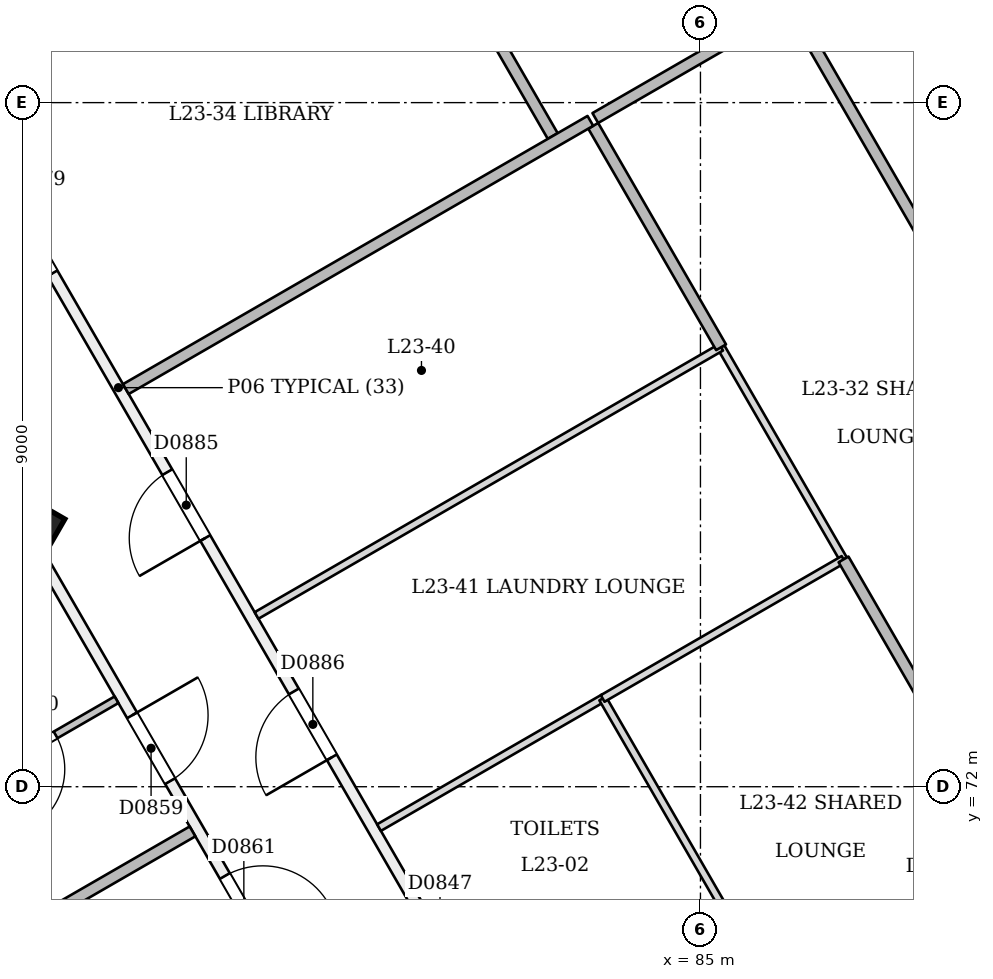
"""IFC4 building model, lengths in metres.
Left out: names, types, materials, properties, quantities, classifications, styles, units other than length and angle.
Written with IfcOpenShell. Run it as: python <this file> out.ifc"""

import sys

from ifc_helpers import new_model, si_unit, direction, frame, frame_2d, origin, origin_2d, place, context, subcontext, project, spatial, rectangle, extrude, element, fill, save


model = new_model("IFC4")
c1 = context("Model", 3, precision=1e-05, world=origin(), true_north=direction((0.0, 1.0)))
c2 = subcontext(c1, "Body", "Model", "MODEL_VIEW")
j1 = project(units=[si_unit("LENGTHUNIT", "METRE"), si_unit("PLANEANGLEUNIT", "RADIAN")], contexts=[c1])
p1 = place(None, origin())
s1 = spatial("IfcSite", under=j1, at=p1, CompositionType="ELEMENT")
p2 = place(p1, origin())
s2 = spatial("IfcBuilding", under=s1, at=p2, CompositionType="ELEMENT")
p3 = place(p2, frame((0.0, 0.0, 91.8)))
s3 = spatial("IfcBuildingStorey", under=s2, at=p3, CompositionType="ELEMENT", Elevation=91.8)
p4 = place(p3, frame((76.132, 75.346, -0.021), z_axis=(0.02215519141, 0.038415882353, 0.999016199807), x_axis=(-0.865363485721, -0.499670956286, 0.038405377555)))
e1 = element("IfcColumn", 1, at=p4, inside=s3, PredefinedType="COLUMN", context=c2, shape_type="SweptSolid", body=[
    extrude(rectangle(XDim=0.7, YDim=0.7, at=origin_2d()), origin(), (0.0, 0.0, 1.0), 3.604),
])
p5 = place(p3, frame((84.935, 64.1, 0.0), z_axis=(0.0, 0.0, 1.0), x_axis=(-0.500003132916, 0.866023594987, 0.0)))
e2 = element("IfcWall", 2, at=p5, inside=s3, PredefinedType="PARTITIONING", context=c2, shape_type="SweptSolid", body=[
    extrude(rectangle(XDim=30.368, YDim=0.15, at=frame_2d((15.184, 0.0))), origin(), (0.0, 0.0, 1.0), 3.3),
])
p6 = place(p5, frame((6.273, 0.0, 0.0)))
e3 = element("IfcOpeningElement", 3, at=p6, cuts=e2, PredefinedType="OPENING", context=c2, shape_type="SweptSolid", body=[
    extrude(rectangle(XDim=0.9, YDim=2.1, at=frame_2d((0.45, 1.05))), frame((0.0, 0.085, 0.0), z_axis=(0.0, -1.0, 0.0), x_axis=(1.0, 0.0, 0.0)), (0.0, 0.0, 1.0), 0.171),
])
p7 = place(p5, frame((21.525, 0.0, 0.0)))
e4 = element("IfcOpeningElement", 4, at=p7, cuts=e2, PredefinedType="OPENING", context=c2, shape_type="SweptSolid", body=[
    extrude(rectangle(XDim=1.0, YDim=2.1, at=frame_2d((0.5, 1.05))), frame((0.0, 0.085, 0.0), z_axis=(0.0, -1.0, 0.0), x_axis=(1.0, 0.0, 0.0)), (0.0, 0.0, 1.0), 0.171),
])
p8 = place(p5, frame((16.921, 0.0, 0.0)))
e5 = element("IfcOpeningElement", 5, at=p8, cuts=e2, PredefinedType="OPENING", context=c2, shape_type="SweptSolid", body=[
    extrude(rectangle(XDim=1.0, YDim=2.1, at=frame_2d((0.5, 1.05))), frame((0.0, 0.085, 0.0), z_axis=(0.0, -1.0, 0.0), x_axis=(1.0, 0.0, 0.0)), (0.0, 0.0, 1.0), 0.171),
])
p9 = place(p5, frame((26.041, 0.0, 0.0)))
e6 = element("IfcOpeningElement", 6, at=p9, cuts=e2, PredefinedType="OPENING", context=c2, shape_type="SweptSolid", body=[
    extrude(rectangle(XDim=1.0, YDim=2.1, at=frame_2d((0.5, 1.05))), frame((0.0, 0.085, 0.0), z_axis=(0.0, -1.0, 0.0), x_axis=(1.0, 0.0, 0.0)), (0.0, 0.0, 1.0), 0.171),
])
p10 = place(p5, frame((12.9, 0.0, 0.0)))
e7 = element("IfcOpeningElement", 7, at=p10, cuts=e2, PredefinedType="OPENING", context=c2, shape_type="SweptSolid", body=[
    extrude(rectangle(XDim=1.0, YDim=2.1, at=frame_2d((0.5, 1.05))), frame((0.0, 0.085, 0.0), z_axis=(0.0, -1.0, 0.0), x_axis=(1.0, 0.0, 0.0)), (0.0, 0.0, 1.0), 0.171),
])
p11 = place(p5, frame((9.569, 0.0, 0.0)))
e8 = element("IfcOpeningElement", 8, at=p11, cuts=e2, PredefinedType="OPENING", context=c2, shape_type="SweptSolid", body=[
    extrude(rectangle(XDim=1.0, YDim=2.1, at=frame_2d((0.5, 1.05))), frame((0.0, 0.085, 0.0), z_axis=(0.0, -1.0, 0.0), x_axis=(1.0, 0.0, 0.0)), (0.0, 0.0, 1.0), 0.171),
])
p12 = place(p3, frame((100.249, 90.4, 0.0), z_axis=(0.0, 0.0, 1.0), x_axis=(-0.500002168127, -0.866024152012, 0.0)))
e9 = element("IfcWall", 9, at=p12, inside=s3, PredefinedType="PARTITIONING", context=c2, shape_type="SweptSolid", body=[
    extrude(rectangle(XDim=30.498, YDim=0.15, at=frame_2d((15.249, 0.0))), origin(), (0.0, 0.0, 1.0), 3.3),
])
p13 = place(p12, frame((27.157, 0.0, 0.0)))
e10 = element("IfcOpeningElement", 10, at=p13, cuts=e9, PredefinedType="OPENING", context=c2, shape_type="SweptSolid", body=[
    extrude(rectangle(XDim=0.9, YDim=2.1, at=frame_2d((0.45, 1.05))), frame((0.0, 0.085, 0.0), z_axis=(0.0, -1.0, 0.0), x_axis=(1.0, 0.0, 0.0)), (0.0, 0.0, 1.0), 0.171),
])
p14 = place(p12, frame((2.412, 0.0, 0.0)))
e11 = element("IfcOpeningElement", 11, at=p14, cuts=e9, PredefinedType="OPENING", context=c2, shape_type="SweptSolid", body=[
    extrude(rectangle(XDim=1.0, YDim=2.1, at=frame_2d((0.5, 1.05))), frame((0.0, 0.085, 0.0), z_axis=(0.0, -1.0, 0.0), x_axis=(1.0, 0.0, 0.0)), (0.0, 0.0, 1.0), 0.171),
])
p15 = place(p12, frame((11.533, 0.0, 0.0)))
e12 = element("IfcOpeningElement", 12, at=p15, cuts=e9, PredefinedType="OPENING", context=c2, shape_type="SweptSolid", body=[
    extrude(rectangle(XDim=1.0, YDim=2.1, at=frame_2d((0.5, 1.05))), frame((0.0, 0.085, 0.0), z_axis=(0.0, -1.0, 0.0), x_axis=(1.0, 0.0, 0.0)), (0.0, 0.0, 1.0), 0.171),
])
p16 = place(p12, frame((18.89, 0.0, 0.0)))
e13 = element("IfcOpeningElement", 13, at=p16, cuts=e9, PredefinedType="OPENING", context=c2, shape_type="SweptSolid", body=[
    extrude(rectangle(XDim=1.2, YDim=2.1, at=frame_2d((0.6, 1.05))), frame((0.0, 0.085, 0.0), z_axis=(0.0, -1.0, 0.0), x_axis=(1.0, 0.0, 0.0)), (0.0, 0.0, 1.0), 0.171),
])
p17 = place(p12, frame((7.003, 0.0, 0.0)))
e14 = element("IfcOpeningElement", 14, at=p17, cuts=e9, PredefinedType="OPENING", context=c2, shape_type="SweptSolid", body=[
    extrude(rectangle(XDim=1.0, YDim=2.1, at=frame_2d((0.5, 1.05))), frame((0.0, 0.085, 0.0), z_axis=(0.0, -1.0, 0.0), x_axis=(1.0, 0.0, 0.0)), (0.0, 0.0, 1.0), 0.171),
])
p18 = place(p12, frame((15.43, 0.0, 0.0)))
e15 = element("IfcOpeningElement", 15, at=p18, cuts=e9, PredefinedType="OPENING", context=c2, shape_type="SweptSolid", body=[
    extrude(rectangle(XDim=1.0, YDim=2.1, at=frame_2d((0.5, 1.05))), frame((0.0, 0.085, 0.0), z_axis=(0.0, -1.0, 0.0), x_axis=(1.0, 0.0, 0.0)), (0.0, 0.0, 1.0), 0.171),
])
p19 = place(p12, frame((22.512, 0.0, 0.0)))
e16 = element("IfcOpeningElement", 16, at=p19, cuts=e9, PredefinedType="OPENING", context=c2, shape_type="SweptSolid", body=[
    extrude(rectangle(XDim=1.2, YDim=2.1, at=frame_2d((0.6, 1.05))), frame((0.0, 0.085, 0.0), z_axis=(0.0, -1.0, 0.0), x_axis=(1.0, 0.0, 0.0)), (0.0, 0.0, 1.0), 0.171),
])
p20 = place(p3, frame((63.319, 97.54, 0.0), z_axis=(0.0, 0.0, 1.0), x_axis=(0.500001382442, -0.86602460563, 0.0)))
e17 = element("IfcWall", 17, at=p20, inside=s3, PredefinedType="PARTITIONING", context=c2, shape_type="SweptSolid", body=[
    extrude(rectangle(XDim=42.252, YDim=0.15, at=frame_2d((21.126, 0.0))), origin(), (0.0, 0.0, 1.0), 2.9),
])
p21 = place(p20, frame((3.076, 0.0, 0.0)))
e18 = element("IfcOpeningElement", 18, at=p21, cuts=e17, PredefinedType="OPENING", context=c2, shape_type="SweptSolid", body=[
    extrude(rectangle(XDim=1.2, YDim=2.1, at=frame_2d((0.6, 1.05))), frame((0.0, 0.085, 0.0), z_axis=(0.0, -1.0, 0.0), x_axis=(1.0, 0.0, 0.0)), (0.0, 0.0, 1.0), 0.171),
])
p22 = place(p20, frame((10.455, 0.0, 0.0)))
e19 = element("IfcOpeningElement", 19, at=p22, cuts=e17, PredefinedType="OPENING", context=c2, shape_type="SweptSolid", body=[
    extrude(rectangle(XDim=1.1, YDim=2.1, at=frame_2d((0.55, 1.05))), frame((0.0, 0.085, 0.0), z_axis=(0.0, -1.0, 0.0), x_axis=(1.0, 0.0, 0.0)), (0.0, 0.0, 1.0), 0.171),
])
p23 = place(p20, frame((13.876, 0.0, 0.0)))
e20 = element("IfcOpeningElement", 20, at=p23, cuts=e17, PredefinedType="OPENING", context=c2, shape_type="SweptSolid", body=[
    extrude(rectangle(XDim=1.0, YDim=2.1, at=frame_2d((0.5, 1.05))), frame((0.0, 0.085, 0.0), z_axis=(0.0, -1.0, 0.0), x_axis=(1.0, 0.0, 0.0)), (0.0, 0.0, 1.0), 0.171),
])
p24 = place(p20, frame((18.376, 0.0, 0.0)))
e21 = element("IfcOpeningElement", 21, at=p24, cuts=e17, PredefinedType="OPENING", context=c2, shape_type="SweptSolid", body=[
    extrude(rectangle(XDim=1.0, YDim=2.1, at=frame_2d((0.5, 1.05))), frame((0.0, 0.085, 0.0), z_axis=(0.0, -1.0, 0.0), x_axis=(1.0, 0.0, 0.0)), (0.0, 0.0, 1.0), 0.171),
])
p25 = place(p20, frame((21.731, 0.0, 0.0)))
e22 = element("IfcOpeningElement", 22, at=p25, cuts=e17, PredefinedType="OPENING", context=c2, shape_type="SweptSolid", body=[
    extrude(rectangle(XDim=1.0, YDim=2.1, at=frame_2d((0.5, 1.05))), frame((0.0, 0.085, 0.0), z_axis=(0.0, -1.0, 0.0), x_axis=(1.0, 0.0, 0.0)), (0.0, 0.0, 1.0), 0.171),
])
p26 = place(p20, frame((28.406, 0.0, 0.0)))
e23 = element("IfcOpeningElement", 23, at=p26, cuts=e17, PredefinedType="OPENING", context=c2, shape_type="SweptSolid", body=[
    extrude(rectangle(XDim=1.0, YDim=2.1, at=frame_2d((0.5, 1.05))), frame((0.0, 0.085, 0.0), z_axis=(0.0, -1.0, 0.0), x_axis=(1.0, 0.0, 0.0)), (0.0, 0.0, 1.0), 0.171),
])
p27 = place(p20, frame((30.847, 0.0, 0.0)))
e24 = element("IfcOpeningElement", 24, at=p27, cuts=e17, PredefinedType="OPENING", context=c2, shape_type="SweptSolid", body=[
    extrude(rectangle(XDim=1.0, YDim=2.1, at=frame_2d((0.5, 1.05))), frame((0.0, 0.085, 0.0), z_axis=(0.0, -1.0, 0.0), x_axis=(1.0, 0.0, 0.0)), (0.0, 0.0, 1.0), 0.171),
])
p28 = place(p20, frame((37.989, 0.0, 0.0)))
e25 = element("IfcOpeningElement", 25, at=p28, cuts=e17, PredefinedType="OPENING", context=c2, shape_type="SweptSolid", body=[
    extrude(rectangle(XDim=1.2, YDim=2.1, at=frame_2d((0.6, 1.05))), frame((0.0, 0.085, 0.0), z_axis=(0.0, -1.0, 0.0), x_axis=(1.0, 0.0, 0.0)), (0.0, 0.0, 1.0), 0.171),
])
p29 = place(p3, frame((85.554, 60.948, 0.0), z_axis=(0.0, 0.0, 1.0), x_axis=(0.500001382442, 0.86602460563, 0.0)))
e26 = element("IfcWall", 26, at=p29, inside=s3, PredefinedType="PARTITIONING", context=c2, shape_type="SweptSolid", body=[
    extrude(rectangle(XDim=42.252, YDim=0.15, at=frame_2d((21.126, 0.0))), origin(), (0.0, 0.0, 1.0), 2.9),
])
p30 = place(p29, frame((0.285, 0.0, 0.0)))
e27 = element("IfcOpeningElement", 27, at=p30, cuts=e26, PredefinedType="OPENING", context=c2, shape_type="SweptSolid", body=[
    extrude(rectangle(XDim=1.2, YDim=2.1, at=frame_2d((0.6, 1.05))), frame((0.0, 0.085, 0.0), z_axis=(0.0, -1.0, 0.0), x_axis=(1.0, 0.0, 0.0)), (0.0, 0.0, 1.0), 0.171),
])
p31 = place(p29, frame((3.731, 0.0, 0.0)))
e28 = element("IfcOpeningElement", 28, at=p31, cuts=e26, PredefinedType="OPENING", context=c2, shape_type="SweptSolid", body=[
    extrude(rectangle(XDim=1.0, YDim=2.1, at=frame_2d((0.5, 1.05))), frame((0.0, 0.085, 0.0), z_axis=(0.0, -1.0, 0.0), x_axis=(1.0, 0.0, 0.0)), (0.0, 0.0, 1.0), 0.171),
])
p32 = place(p29, frame((11.526, 0.0, 0.0)))
e29 = element("IfcOpeningElement", 29, at=p32, cuts=e26, PredefinedType="OPENING", context=c2, shape_type="SweptSolid", body=[
    extrude(rectangle(XDim=1.2, YDim=2.1, at=frame_2d((0.6, 1.05))), frame((0.0, 0.085, 0.0), z_axis=(0.0, -1.0, 0.0), x_axis=(1.0, 0.0, 0.0)), (0.0, 0.0, 1.0), 0.171),
])
p33 = place(p29, frame((18.376, 0.0, 0.0)))
e30 = element("IfcOpeningElement", 30, at=p33, cuts=e26, PredefinedType="OPENING", context=c2, shape_type="SweptSolid", body=[
    extrude(rectangle(XDim=1.0, YDim=2.1, at=frame_2d((0.5, 1.05))), frame((0.0, 0.085, 0.0), z_axis=(0.0, -1.0, 0.0), x_axis=(1.0, 0.0, 0.0)), (0.0, 0.0, 1.0), 0.171),
])
p34 = place(p29, frame((21.731, 0.0, 0.0)))
e31 = element("IfcOpeningElement", 31, at=p34, cuts=e26, PredefinedType="OPENING", context=c2, shape_type="SweptSolid", body=[
    extrude(rectangle(XDim=1.0, YDim=2.1, at=frame_2d((0.5, 1.05))), frame((0.0, 0.085, 0.0), z_axis=(0.0, -1.0, 0.0), x_axis=(1.0, 0.0, 0.0)), (0.0, 0.0, 1.0), 0.171),
])
p35 = place(p29, frame((27.376, 0.0, 0.0)))
e32 = element("IfcOpeningElement", 32, at=p35, cuts=e26, PredefinedType="OPENING", context=c2, shape_type="SweptSolid", body=[
    extrude(rectangle(XDim=1.0, YDim=2.1, at=frame_2d((0.5, 1.05))), frame((0.0, 0.085, 0.0), z_axis=(0.0, -1.0, 0.0), x_axis=(1.0, 0.0, 0.0)), (0.0, 0.0, 1.0), 0.171),
])
p36 = place(p29, frame((30.697, 0.0, 0.0)))
e33 = element("IfcOpeningElement", 33, at=p36, cuts=e26, PredefinedType="OPENING", context=c2, shape_type="SweptSolid", body=[
    extrude(rectangle(XDim=1.1, YDim=2.1, at=frame_2d((0.55, 1.05))), frame((0.0, 0.085, 0.0), z_axis=(0.0, -1.0, 0.0), x_axis=(1.0, 0.0, 0.0)), (0.0, 0.0, 1.0), 0.171),
])
p37 = place(p29, frame((37.976, 0.0, 0.0)))
e34 = element("IfcOpeningElement", 34, at=p37, cuts=e26, PredefinedType="OPENING", context=c2, shape_type="SweptSolid", body=[
    extrude(rectangle(XDim=1.2, YDim=2.1, at=frame_2d((0.6, 1.05))), frame((0.0, 0.085, 0.0), z_axis=(0.0, -1.0, 0.0), x_axis=(1.0, 0.0, 0.0)), (0.0, 0.0, 1.0), 0.171),
])
p38 = place(p3, frame((83.731, 73.171, 0.0), z_axis=(0.0, 0.0, 1.0), x_axis=(-0.8660321259, -0.499988356774, 0.0)))
e35 = element("IfcWall", 35, at=p38, inside=s3, PredefinedType="PARTITIONING", context=c2, shape_type="SweptSolid", body=[
    extrude(rectangle(XDim=3.417, YDim=0.1, at=frame_2d((1.709, 0.0))), origin(), (0.0, 0.0, 1.0), 3.3),
])
p39 = place(p3, frame((86.947, 67.56, 0.0), z_axis=(0.0, 0.0, 1.0), x_axis=(-0.499983865786, 0.866034718677, 0.0)))
e36 = element("IfcWall", 36, at=p39, inside=s3, PredefinedType="PARTITIONING", context=c2, shape_type="SweptSolid", body=[
    extrude(rectangle(XDim=6.468, YDim=0.1, at=frame_2d((3.234, 0.0))), origin(), (0.0, 0.0, 1.0), 3.3),
])
p40 = place(p3, frame((77.317, 73.144, 0.0), z_axis=(0.0, 0.0, 1.0), x_axis=(-0.866048868473, -0.499959355765, 0.0)))
e37 = element("IfcWall", 37, at=p40, inside=s3, PredefinedType="PARTITIONING", context=c2, shape_type="SweptSolid", body=[
    extrude(rectangle(XDim=2.825, YDim=0.1, at=frame_2d((1.413, 0.0))), origin(), (0.0, 0.0, 1.0), 3.3),
])
p41 = place(p40, frame((0.925, 0.0, 0.0)))
e38 = element("IfcOpeningElement", 38, at=p41, cuts=e37, PredefinedType="OPENING", context=c2, shape_type="SweptSolid", body=[
    extrude(rectangle(XDim=0.9, YDim=2.1, at=frame_2d((0.45, 1.05))), frame((0.0, 0.061, 0.0), z_axis=(0.0, -1.0, 0.0), x_axis=(1.0, 0.0, 0.0)), (0.0, 0.0, 1.0), 0.121),
])
p42 = place(p3, frame((72.822, 68.24, 0.0), z_axis=(0.0, 0.0, 1.0), x_axis=(0.866025401434, 0.500000004071, 0.0)))
e39 = element("IfcWall", 39, at=p42, inside=s3, PredefinedType="PARTITIONING", context=c2, shape_type="SweptSolid", body=[
    extrude(rectangle(XDim=6.345, YDim=0.15, at=frame_2d((3.173, 0.0))), origin(), (0.0, 0.0, 1.0), 3.3),
])
p43 = place(p3, frame((86.117, 82.241, 0.0), z_axis=(0.0, 0.0, 1.0), x_axis=(-0.866048989054, -0.499959146889, 0.0)))
e40 = element("IfcWall", 40, at=p43, inside=s3, PredefinedType="PARTITIONING", context=c2, shape_type="SweptSolid", body=[
    extrude(rectangle(XDim=2.887, YDim=0.15, at=frame_2d((1.443, 0.0))), origin(), (0.0, 0.0, 1.0), 3.3),
])
p44 = place(p3, frame((90.806, 74.269, 0.0), z_axis=(0.0, 0.0, 1.0), x_axis=(-0.499989052516, 0.866031724225, 0.0)))
e41 = element("IfcWall", 41, at=p44, inside=s3, PredefinedType="PARTITIONING", context=c2, shape_type="SweptSolid", body=[
    extrude(rectangle(XDim=9.248, YDim=0.15, at=frame_2d((4.624, 0.0))), origin(), (0.0, 0.0, 1.0), 3.3),
])
p45 = place(p3, frame((83.589, 80.695, 0.0), z_axis=(0.0, 0.0, 1.0), x_axis=(0.500026084466, -0.866010343387, 0.0)))
e42 = element("IfcWall", 42, at=p45, inside=s3, PredefinedType="PARTITIONING", context=c2, shape_type="SweptSolid", body=[
    extrude(rectangle(XDim=3.364, YDim=0.15, at=frame_2d((1.682, 0.0))), origin(), (0.0, 0.0, 1.0), 3.3),
])
p46 = place(p3, frame((85.271, 77.781, 0.0), z_axis=(0.0, 0.0, 1.0), x_axis=(0.499960739398, -0.866048069717, 0.0)))
e43 = element("IfcWall", 43, at=p46, inside=s3, PredefinedType="PARTITIONING", context=c2, shape_type="SweptSolid", body=[
    extrude(rectangle(XDim=3.222, YDim=0.1, at=frame_2d((1.611, 0.0))), origin(), (0.0, 0.0, 1.0), 3.3),
])
p47 = place(p3, frame((86.883, 74.991, 0.0), z_axis=(0.0, 0.0, 1.0), x_axis=(0.500004862322, -0.866022596503, 0.0)))
e44 = element("IfcWall", 44, at=p47, inside=s3, PredefinedType="PARTITIONING", context=c2, shape_type="SweptSolid", body=[
    extrude(rectangle(XDim=4.34, YDim=0.15, at=frame_2d((2.17, 0.0))), origin(), (0.0, 0.0, 1.0), 3.3),
])
p48 = place(p3, frame((75.138, 81.219, 0.0), z_axis=(0.0, 0.0, 1.0), x_axis=(0.866011069627, 0.500024826668, 0.0)))
e45 = element("IfcWall", 45, at=p48, inside=s3, PredefinedType="PARTITIONING", context=c2, shape_type="SweptSolid", body=[
    extrude(rectangle(XDim=6.453, YDim=0.15, at=frame_2d((3.227, 0.0))), origin(), (0.0, 0.0, 1.0), 3.3),
])
p49 = place(p3, frame((83.057, 80.561, 0.0), z_axis=(0.0, 0.0, 1.0), x_axis=(-0.500011831956, 0.866018572493, 0.0)))
e46 = element("IfcWall", 46, at=p49, inside=s3, PredefinedType="PARTITIONING", context=c2, shape_type="SweptSolid", body=[
    extrude(rectangle(XDim=9.153, YDim=0.15, at=frame_2d((4.577, 0.0))), origin(), (0.0, 0.0, 1.0), 3.3),
])
p50 = place(p3, frame((77.44, 77.231, 0.0), z_axis=(0.0, 0.0, 1.0), x_axis=(0.866028878405, 0.499993981732, 0.0)))
e47 = element("IfcWall", 47, at=p50, inside=s3, PredefinedType="PARTITIONING", context=c2, shape_type="SweptSolid", body=[
    extrude(rectangle(XDim=7.057, YDim=0.15, at=frame_2d((3.528, 0.0))), origin(), (0.0, 0.0, 1.0), 3.3),
])
p51 = place(p3, frame((79.16, 74.253, 0.0), z_axis=(0.0, 0.0, 1.0), x_axis=(0.86602254688, 0.500004948271, 0.0)))
e48 = element("IfcWall", 48, at=p51, inside=s3, PredefinedType="PARTITIONING", context=c2, shape_type="SweptSolid", body=[
    extrude(rectangle(XDim=7.057, YDim=0.1, at=frame_2d((3.529, 0.0))), origin(), (0.0, 0.0, 1.0), 3.3),
])
p52 = place(p3, frame((83.713, 73.161, 0.0), z_axis=(0.0, 0.0, 1.0), x_axis=(0.866042269935, 0.499970785833, 0.0)))
e49 = element("IfcWall", 49, at=p52, inside=s3, PredefinedType="PARTITIONING", context=c2, shape_type="SweptSolid", body=[
    extrude(rectangle(XDim=3.659, YDim=0.1, at=frame_2d((1.83, 0.0))), origin(), (0.0, 0.0, 1.0), 3.3),
])
p53 = place(p26, origin())
e50 = element("IfcDoor", 50, at=p53, inside=s3, OperationType="SINGLE_SWING_LEFT", PredefinedType="NOTDEFINED", context=c2, shape_type="SweptSolid", body=[
    extrude(rectangle(XDim=1.0, YDim=2.1, at=frame_2d((0.5, 1.05))), frame((0.0, 0.025, 0.0), z_axis=(0.0, -1.0, 0.0), x_axis=(1.0, 0.0, 0.0)), (0.0, 0.0, 1.0), 0.05),
])
fill(e23, e50)
p54 = place(p41, origin())
e51 = element("IfcDoor", 51, at=p54, inside=s3, OperationType="SINGLE_SWING_RIGHT", PredefinedType="NOTDEFINED", context=c2, shape_type="SweptSolid", body=[
    extrude(rectangle(XDim=0.9, YDim=2.1, at=frame_2d((0.45, 1.05))), frame((0.0, 0.025, 0.0), z_axis=(0.0, -1.0, 0.0), x_axis=(1.0, 0.0, 0.0)), (0.0, 0.0, 1.0), 0.05),
])
fill(e38, e51)
p55 = place(p27, origin())
e52 = element("IfcDoor", 52, at=p55, inside=s3, OperationType="SINGLE_SWING_RIGHT", PredefinedType="NOTDEFINED", context=c2, shape_type="SweptSolid", body=[
    extrude(rectangle(XDim=1.0, YDim=2.1, at=frame_2d((0.5, 1.05))), frame((0.0, 0.025, 0.0), z_axis=(0.0, -1.0, 0.0), x_axis=(1.0, 0.0, 0.0)), (0.0, 0.0, 1.0), 0.05),
])
fill(e24, e52)
p56 = place(p8, origin())
e53 = element("IfcDoor", 53, at=p56, inside=s3, OperationType="SINGLE_SWING_LEFT", PredefinedType="NOTDEFINED", context=c2, shape_type="SweptSolid", body=[
    extrude(rectangle(XDim=1.0, YDim=2.1, at=frame_2d((0.5, 1.05))), frame((0.0, 0.025, 0.0), z_axis=(0.0, -1.0, 0.0), x_axis=(1.0, 0.0, 0.0)), (0.0, 0.0, 1.0), 0.05),
])
fill(e5, e53)
p57 = place(p10, origin())
e54 = element("IfcDoor", 54, at=p57, inside=s3, OperationType="SINGLE_SWING_LEFT", PredefinedType="NOTDEFINED", context=c2, shape_type="SweptSolid", body=[
    extrude(rectangle(XDim=1.0, YDim=2.1, at=frame_2d((0.5, 1.05))), frame((0.0, 0.025, 0.0), z_axis=(0.0, -1.0, 0.0), x_axis=(1.0, 0.0, 0.0)), (0.0, 0.0, 1.0), 0.05),
])
fill(e7, e54)
p58 = place(p11, origin())
e55 = element("IfcDoor", 55, at=p58, inside=s3, OperationType="SINGLE_SWING_LEFT", PredefinedType="NOTDEFINED", context=c2, shape_type="SweptSolid", body=[
    extrude(rectangle(XDim=1.0, YDim=2.1, at=frame_2d((0.5, 1.05))), frame((0.0, 0.025, 0.0), z_axis=(0.0, -1.0, 0.0), x_axis=(1.0, 0.0, 0.0)), (0.0, 0.0, 1.0), 0.05),
])
fill(e8, e55)
save(model, sys.argv[1])
